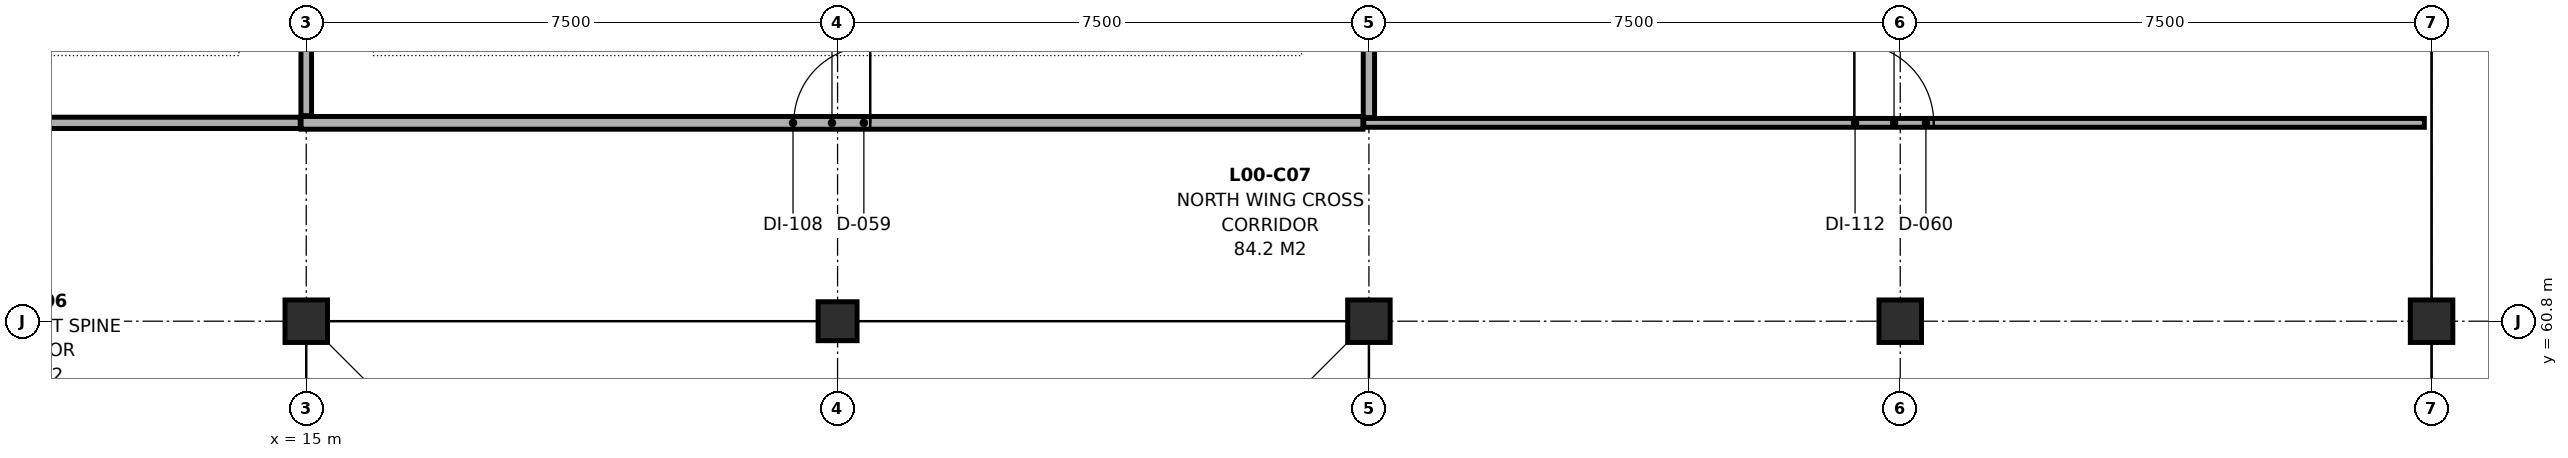
"""IFC4 building model, lengths in metres.
Left out: names, types, materials, properties, quantities, classifications, styles, units other than length and angle.
Written with IfcOpenShell. Run it as: python <this file> out.ifc"""

import sys

from ifc_helpers import new_model, si_unit, direction, frame, frame_2d, origin, origin_2d, place, context, subcontext, project, spatial, rectangle, extrude, element, fill, save


model = new_model("IFC4")
c1 = context("Model", 3, precision=1e-05, world=origin(), true_north=direction((0.0, 1.0)))
c2 = subcontext(c1, "Body", "Model", "MODEL_VIEW")
j1 = project(units=[si_unit("LENGTHUNIT", "METRE"), si_unit("PLANEANGLEUNIT", "RADIAN")], contexts=[c1])
p1 = place(None, origin())
s1 = spatial("IfcSite", under=j1, at=p1, CompositionType="ELEMENT")
p2 = place(p1, origin())
s2 = spatial("IfcBuilding", under=s1, at=p2, CompositionType="ELEMENT")
p3 = place(p2, origin())
s3 = spatial("IfcBuildingStorey", under=s2, at=p3, CompositionType="ELEMENT", Elevation=0.0)
p4 = place(p3, frame((15.0, 60.8, 0.0), z_axis=(0.0, 0.0, 1.0), x_axis=(1.0, 0.0, 0.0)))
e1 = element("IfcColumn", 1, at=p4, inside=s3, PredefinedType="COLUMN", context=c2, shape_type="SweptSolid", body=[
    extrude(rectangle(XDim=0.6, YDim=0.6, at=origin_2d()), origin(), (0.0, 0.0, 1.0), 4.7),
])
p5 = place(p3, frame((22.5, 60.8, 0.0), z_axis=(0.0, 0.0, 1.0), x_axis=(1.0, 0.0, 0.0)))
e2 = element("IfcColumn", 2, at=p5, inside=s3, PredefinedType="COLUMN", context=c2, shape_type="SweptSolid", body=[
    extrude(rectangle(XDim=0.55, YDim=0.55, at=origin_2d()), origin(), (0.0, 0.0, 1.0), 4.7),
])
for number, where, z_axis, x_axis in (
    (3, (30.0, 60.8, 0.0), (0.0, 0.0, 1.0), (1.0, 0.0, 0.0)),
    (4, (37.5, 60.8, 0.0), (0.0, 0.0, 1.0), (1.0, 0.0, 0.0)),
    (5, (45.0, 60.8, 0.0), (0.0, 0.0, 1.0), (1.0, 0.0, 0.0)),
):
    element("IfcColumn", number, at=place(p3, frame(where, z_axis=z_axis, x_axis=x_axis)), inside=s3, PredefinedType="COLUMN", context=c2, shape_type="SweptSolid", body=[
        extrude(rectangle(XDim=0.6, YDim=0.6, at=origin_2d()), origin(), (0.0, 0.0, 1.0), 4.7),
    ])
p6 = place(p3, frame((0.102, 63.6, 0.0), z_axis=(0.0, 0.0, 1.0), x_axis=(1.0, 0.0, 0.0)))
e6 = element("IfcWall", 6, at=p6, inside=s3, PredefinedType="PARTITIONING", context=c2, shape_type="SweptSolid", body=[
    extrude(rectangle(XDim=14.813, YDim=0.16, at=frame_2d((7.406, 0.0))), origin(), (0.0, 0.0, 1.0), 3.765),
])
p7 = place(p6, frame((6.917, 0.0, 0.0)))
e7 = element("IfcOpeningElement", 7, at=p7, cuts=e6, PredefinedType="OPENING", context=c2, shape_type="SweptSolid", body=[
    extrude(rectangle(XDim=0.98, YDim=2.12, at=frame_2d((0.49, 1.06))), frame((0.0, 0.092, 0.0), z_axis=(0.0, -1.0, 0.0), x_axis=(1.0, 0.0, 0.0)), (0.0, 0.0, 1.0), 0.184),
])
p8 = place(p3, frame((14.927, 63.6, 0.0), z_axis=(0.0, 0.0, 1.0), x_axis=(1.0, 0.0, 0.0)))
e8 = element("IfcWall", 8, at=p8, inside=s3, PredefinedType="PARTITIONING", context=c2, shape_type="SweptSolid", body=[
    extrude(rectangle(XDim=14.988, YDim=0.18, at=frame_2d((7.494, 0.0))), origin(), (0.0, 0.0, 1.0), 3.765),
])
p9 = place(p8, frame((6.954, 0.0, 0.0)))
e9 = element("IfcOpeningElement", 9, at=p9, cuts=e8, PredefinedType="OPENING", context=c2, shape_type="SweptSolid", body=[
    extrude(rectangle(XDim=1.08, YDim=2.18, at=frame_2d((0.54, 1.09))), frame((0.0, 0.102, 0.0), z_axis=(0.0, -1.0, 0.0), x_axis=(1.0, 0.0, 0.0)), (0.0, 0.0, 1.0), 0.204),
])
p10 = place(p3, frame((29.927, 63.6, 0.0), z_axis=(0.0, 0.0, 1.0), x_axis=(1.0, 0.0, 0.0)))
e10 = element("IfcWall", 10, at=p10, inside=s3, PredefinedType="PARTITIONING", context=c2, shape_type="SweptSolid", body=[
    extrude(rectangle(XDim=14.971, YDim=0.125, at=frame_2d((7.485, 0.0))), origin(), (0.0, 0.0, 1.0), 3.985),
])
p11 = place(p10, frame((6.926, 0.0, 0.0)))
e11 = element("IfcOpeningElement", 11, at=p11, cuts=e10, PredefinedType="OPENING", context=c2, shape_type="SweptSolid", body=[
    extrude(rectangle(XDim=1.12, YDim=2.2, at=frame_2d((0.56, 1.1))), frame((0.0, 0.074, 0.0), z_axis=(0.0, -1.0, 0.0), x_axis=(1.0, 0.0, 0.0)), (0.0, 0.0, 1.0), 0.149),
])
p12 = place(p3, frame((15.0, 63.702, 0.0), z_axis=(0.0, 0.0, 1.0), x_axis=(0.0, 1.0, 0.0)))
e12 = element("IfcWall", 12, at=p12, inside=s3, PredefinedType="PARTITIONING", context=c2, shape_type="SweptSolid", body=[
    extrude(rectangle(XDim=11.786, YDim=0.15, at=frame_2d((5.893, 0.0))), origin(), (0.0, 0.0, 1.0), 3.765),
])
p13 = place(p3, frame((30.0, 63.675, 0.0), z_axis=(0.0, 0.0, 1.0), x_axis=(0.0, 1.0, 0.0)))
e13 = element("IfcWall", 13, at=p13, inside=s3, PredefinedType="PARTITIONING", context=c2, shape_type="SweptSolid", body=[
    extrude(rectangle(XDim=11.838, YDim=0.16, at=frame_2d((5.919, 0.0))), origin(), (0.0, 0.0, 1.0), 3.765),
])
p14 = place(p9, origin())
e14 = element("IfcDoor", 14, at=p14, inside=s3, OperationType="SINGLE_SWING_RIGHT", PredefinedType="DOOR", context=c2, shape_type="SweptSolid", body=[
    extrude(rectangle(XDim=1.08, YDim=2.18, at=frame_2d((0.54, 1.09))), frame((0.0, 0.025, 0.0), z_axis=(0.0, -1.0, 0.0), x_axis=(1.0, 0.0, 0.0)), (0.0, 0.0, 1.0), 0.05),
])
fill(e9, e14)
p15 = place(p11, origin())
e15 = element("IfcDoor", 15, at=p15, inside=s3, OperationType="SINGLE_SWING_LEFT", PredefinedType="DOOR", context=c2, shape_type="SweptSolid", body=[
    extrude(rectangle(XDim=1.12, YDim=2.2, at=frame_2d((0.56, 1.1))), frame((0.0, 0.025, 0.0), z_axis=(0.0, -1.0, 0.0), x_axis=(1.0, 0.0, 0.0)), (0.0, 0.0, 1.0), 0.05),
])
fill(e11, e15)
save(model, sys.argv[1])
